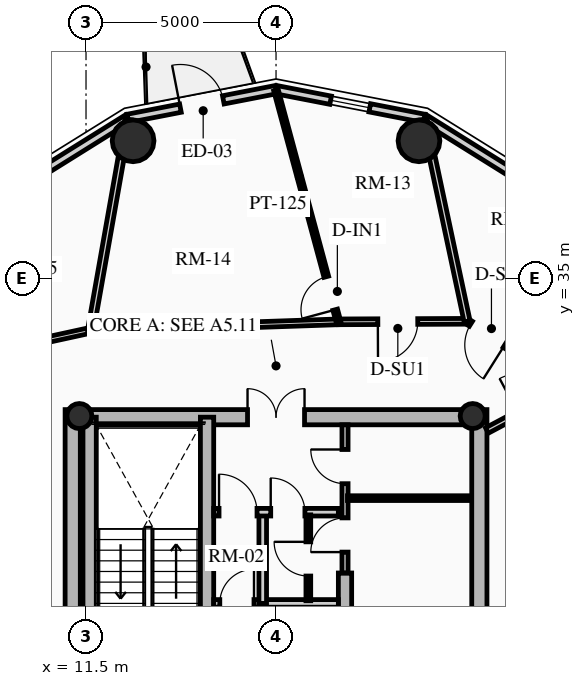
"""IFC4 building model, lengths in metres.
Left out: names, types, materials, properties, quantities, classifications, styles, units other than length and angle.
Written with IfcOpenShell. Run it as: python <this file> out.ifc"""

import sys

from ifc_helpers import new_model, si_unit, direction, frame, frame_2d, origin, origin_2d, place, context, subcontext, project, spatial, rectangle, circle, hollow_circle, extrude, source, transform, mapped, element, fill, save


model = new_model("IFC4")
c1 = context("Model", 3, precision=1e-05, world=origin(), true_north=direction((0.0, 1.0)))
c2 = subcontext(c1, "Body", "Model", "MODEL_VIEW")
j1 = project(units=[si_unit("LENGTHUNIT", "METRE"), si_unit("PLANEANGLEUNIT", "RADIAN")], contexts=[c1])
p1 = place(None, origin())
s1 = spatial("IfcSite", under=j1, at=p1, CompositionType="ELEMENT")
p2 = place(p1, origin())
s2 = spatial("IfcBuilding", under=s1, at=p2, CompositionType="ELEMENT")
p3 = place(p2, frame((0.0, 0.0, 205.39)))
s3 = spatial("IfcBuildingStorey", under=s2, at=p3, CompositionType="ELEMENT", Elevation=205.39)
for number, where, z_axis, x_axis in (
    (1, (11.15, 17.45, 0.0), (0.0, 0.0, 1.0), (0.0, 1.0, 0.0)),
    (2, (21.85, 17.45, 0.0), (0.0, 0.0, 1.0), (0.0, 1.0, 0.0)),
):
    element("IfcWall", number, at=place(p3, frame(where, z_axis=z_axis, x_axis=x_axis)), inside=s3, PredefinedType="SHEAR", context=c2, shape_type="SweptSolid", body=[
        extrude(rectangle(XDim=14.1, YDim=0.4, at=frame_2d((7.05, 0.0))), origin(), (0.0, 0.0, 1.0), 2.91),
    ])
p4 = place(p3, frame((11.15, 31.35, 0.0), z_axis=(0.0, 0.0, 1.0), x_axis=(1.0, 0.0, 0.0)))
e3 = element("IfcWall", 3, at=p4, inside=s3, PredefinedType="SHEAR", context=c2, shape_type="SweptSolid", body=[
    extrude(rectangle(XDim=10.7, YDim=0.4, at=frame_2d((5.35, 0.0))), origin(), (0.0, 0.0, 1.0), 2.91),
])
m1 = source(origin(), c2, "Body", "SweptSolid", [
    extrude(rectangle(XDim=1.5, YDim=2.02, at=frame_2d((0.75, 1.01))), frame((0.0, 0.21, 0.0), z_axis=(0.0, -1.0, 0.0), x_axis=(1.0, 0.0, 0.0)), (0.0, 0.0, 1.0), 0.42),
])
p5 = place(p4, frame((4.6, 0.0, 0.0)))
e4 = element("IfcOpeningElement", 4, at=p5, cuts=e3, PredefinedType="OPENING", context=c2, shape_type="MappedRepresentation", body=[
    mapped(m1, transform((0.0, 0.0, 0.0), x_axis=(1.0, 0.0, 0.0), y_axis=(0.0, 1.0, 0.0), z_axis=(0.0, 0.0, 1.0), scale=1.0)),
])
p6 = place(p3, frame((14.685, 17.65, 0.0), z_axis=(0.0, 0.0, 1.0), x_axis=(0.0, 1.0, 0.0)))
e5 = element("IfcWall", 5, at=p6, inside=s3, PredefinedType="SHEAR", context=c2, shape_type="SweptSolid", body=[
    extrude(rectangle(XDim=13.7, YDim=0.35, at=frame_2d((6.85, 0.0))), origin(), (0.0, 0.0, 1.0), 2.91),
])
m2 = source(origin(), c2, "Body", "SweptSolid", [
    extrude(rectangle(XDim=1.1, YDim=2.015, at=frame_2d((0.55, 1.007))), frame((0.0, 0.185, 0.0), z_axis=(0.0, -1.0, 0.0), x_axis=(1.0, 0.0, 0.0)), (0.0, 0.0, 1.0), 0.37),
])
p7 = place(p6, frame((4.85, 0.0, 0.0)))
e6 = element("IfcOpeningElement", 6, at=p7, cuts=e5, PredefinedType="OPENING", context=c2, shape_type="MappedRepresentation", body=[
    mapped(m2, transform((0.0, 0.0, 0.0), x_axis=(1.0, 0.0, 0.0), y_axis=(0.0, 1.0, 0.0), z_axis=(0.0, 0.0, 1.0), scale=1.0)),
])
p8 = place(p6, frame((0.625, 0.0, 0.0)))
e7 = element("IfcOpeningElement", 7, at=p8, cuts=e5, PredefinedType="OPENING", context=c2, shape_type="MappedRepresentation", body=[
    mapped(m2, transform((0.0, 0.0, 0.0), x_axis=(1.0, 0.0, 0.0), y_axis=(0.0, 1.0, 0.0), z_axis=(0.0, 0.0, 1.0), scale=1.0)),
])
p9 = place(p6, frame((2.625, 0.0, 0.0)))
e8 = element("IfcOpeningElement", 8, at=p9, cuts=e5, PredefinedType="OPENING", context=c2, shape_type="MappedRepresentation", body=[
    mapped(m2, transform((0.0, 0.0, 0.0), x_axis=(1.0, 0.0, 0.0), y_axis=(0.0, 1.0, 0.0), z_axis=(0.0, 0.0, 1.0), scale=1.0)),
])
m3 = source(origin(), c2, "Body", "SweptSolid", [
    extrude(rectangle(XDim=1.15, YDim=2.02, at=frame_2d((0.575, 1.01))), frame((0.0, 0.185, 0.0), z_axis=(0.0, -1.0, 0.0), x_axis=(1.0, 0.0, 0.0)), (0.0, 0.0, 1.0), 0.37),
])
p10 = place(p6, frame((7.27, 0.0, 0.0)))
e9 = element("IfcOpeningElement", 9, at=p10, cuts=e5, PredefinedType="OPENING", context=c2, shape_type="MappedRepresentation", body=[
    mapped(m3, transform((0.0, 0.0, 0.0), x_axis=(1.0, 0.0, 0.0), y_axis=(0.0, 1.0, 0.0), z_axis=(0.0, 0.0, 1.0), scale=1.0)),
])
p11 = place(p3, frame((18.315, 17.65, 0.0), z_axis=(0.0, 0.0, 1.0), x_axis=(0.0, 1.0, 0.0)))
e10 = element("IfcWall", 10, at=p11, inside=s3, PredefinedType="SHEAR", context=c2, shape_type="SweptSolid", body=[
    extrude(rectangle(XDim=9.6, YDim=0.35, at=frame_2d((4.8, 0.0))), origin(), (0.0, 0.0, 1.0), 2.91),
])
p12 = place(p11, frame((5.28, 0.0, 0.0)))
e11 = element("IfcOpeningElement", 11, at=p12, cuts=e10, PredefinedType="OPENING", context=c2, shape_type="MappedRepresentation", body=[
    mapped(m3, transform((0.0, 0.0, 0.0), x_axis=(1.0, 0.0, 0.0), y_axis=(0.0, 1.0, 0.0), z_axis=(0.0, 0.0, 1.0), scale=1.0)),
])
p13 = place(p3, frame((11.595, 24.655, 0.0), z_axis=(0.0, 0.0, 1.0), x_axis=(0.0, 1.0, 0.0)))
e12 = element("IfcWall", 12, at=p13, inside=s3, PredefinedType="SHEAR", context=c2, shape_type="SweptSolid", body=[
    extrude(rectangle(XDim=6.695, YDim=0.35, at=frame_2d((3.348, 0.0))), origin(), (0.0, 0.0, 1.0), 2.91),
])
for number, where, z_axis, x_axis in (
    (13, (11.325, 31.38, 0.0), (0.0, 0.0, 1.0), (1.0, 0.0, 0.0)),
    (14, (21.675, 31.38, 0.0), (0.0, 0.0, 1.0), (1.0, 0.0, 0.0)),
):
    element("IfcColumn", number, at=place(p3, frame(where, z_axis=z_axis, x_axis=x_axis)), inside=s3, PredefinedType="COLUMN", context=c2, shape_type="SweptSolid", body=[
        extrude(hollow_circle(Radius=0.33, WallThickness=0.025, at=origin_2d()), origin(), (0.0, 0.0, 1.0), 2.91),
    ])
for number, where, z_axis, x_axis in (
    (15, (20.261, 38.623, 0.0), (0.0, 0.0, 1.0), (1.0, 0.0, 0.0)),
    (16, (12.739, 38.623, 0.0), (0.0, 0.0, 1.0), (1.0, 0.0, 0.0)),
):
    element("IfcColumn", number, at=place(p3, frame(where, z_axis=z_axis, x_axis=x_axis)), inside=s3, PredefinedType="USERDEFINED", context=c2, shape_type="SweptSolid", body=[
        extrude(circle(Radius=0.55, at=origin_2d()), origin(), (0.0, 0.0, 1.0), 2.91),
    ])
p14 = place(p3, frame((20.403, 39.213, 0.0), z_axis=(0.0, 0.0, 1.0), x_axis=(0.848318713376, -0.529485939886, 0.0)))
e17 = element("IfcWall", 17, at=p14, inside=s3, PredefinedType="SOLIDWALL", context=c2, shape_type="SweptSolid", body=[
    extrude(rectangle(XDim=4.15, YDim=0.22, at=frame_2d((2.075, 0.0))), origin(), (0.0, 0.0, 1.0), 2.322),
])
p15 = place(p3, frame((16.5, 39.97, 0.0), z_axis=(0.0, 0.0, 1.0), x_axis=(0.981700307484, -0.190432419211, 0.0)))
e18 = element("IfcWall", 18, at=p15, inside=s3, PredefinedType="SOLIDWALL", context=c2, shape_type="SweptSolid", body=[
    extrude(rectangle(XDim=3.976, YDim=0.22, at=frame_2d((1.988, 0.0))), origin(), (0.0, 0.0, 1.0), 2.322),
])
m4 = source(origin(), c2, "Body", "SweptSolid", [
    extrude(rectangle(XDim=1.05, YDim=1.3, at=frame_2d((0.525, 0.65))), frame((0.0, 0.12, 0.0), z_axis=(0.0, -1.0, 0.0), x_axis=(1.0, 0.0, 0.0)), (0.0, 0.0, 1.0), 0.24),
])
p16 = place(p15, frame((1.463, 0.0, 0.65)))
e19 = element("IfcOpeningElement", 19, at=p16, cuts=e18, PredefinedType="OPENING", context=c2, shape_type="MappedRepresentation", body=[
    mapped(m4, transform((0.0, 0.0, 0.0), x_axis=(1.0, 0.0, 0.0), y_axis=(0.0, 1.0, 0.0), z_axis=(0.0, 0.0, 1.0), scale=1.0)),
])
p17 = place(p3, frame((12.597, 39.213, 0.0), z_axis=(0.0, 0.0, 1.0), x_axis=(0.981700307484, 0.190432419211, 0.0)))
e20 = element("IfcWall", 20, at=p17, inside=s3, PredefinedType="SOLIDWALL", context=c2, shape_type="SweptSolid", body=[
    extrude(rectangle(XDim=3.976, YDim=0.22, at=frame_2d((1.988, 0.0))), origin(), (0.0, 0.0, 1.0), 2.322),
])
m5 = source(origin(), c2, "Body", "SweptSolid", [
    extrude(rectangle(XDim=1.15, YDim=2.005, at=frame_2d((0.575, 1.002))), frame((0.0, 0.12, 0.0), z_axis=(0.0, -1.0, 0.0), x_axis=(1.0, 0.0, 0.0)), (0.0, 0.0, 1.0), 0.24),
])
p18 = place(p17, frame((1.413, 0.0, 0.0)))
e21 = element("IfcOpeningElement", 21, at=p18, cuts=e20, PredefinedType="OPENING", context=c2, shape_type="MappedRepresentation", body=[
    mapped(m5, transform((0.0, 0.0, 0.0), x_axis=(1.0, 0.0, 0.0), y_axis=(0.0, 1.0, 0.0), z_axis=(0.0, 0.0, 1.0), scale=1.0)),
])
p19 = place(p3, frame((9.076, 37.015, 0.0), z_axis=(0.0, 0.0, 1.0), x_axis=(0.848318713376, 0.529485939886, 0.0)))
e22 = element("IfcWall", 22, at=p19, inside=s3, PredefinedType="SOLIDWALL", context=c2, shape_type="SweptSolid", body=[
    extrude(rectangle(XDim=4.15, YDim=0.22, at=frame_2d((2.075, 0.0))), origin(), (0.0, 0.0, 1.0), 2.322),
])
p20 = place(p3, frame((14.86, 26.45, 0.0), z_axis=(0.0, 0.0, 1.0), x_axis=(1.0, 0.0, 0.0)))
e23 = element("IfcWall", 23, at=p20, inside=s3, PredefinedType="PARTITIONING", context=c2, shape_type="SweptSolid", body=[
    extrude(rectangle(XDim=3.28, YDim=0.2, at=frame_2d((1.64, 0.0))), origin(), (0.0, 0.0, 1.0), 2.685),
])
m6 = source(origin(), c2, "Body", "SweptSolid", [
    extrude(rectangle(XDim=0.9, YDim=2.005, at=frame_2d((0.45, 1.002))), frame((0.0, 0.11, 0.0), z_axis=(0.0, -1.0, 0.0), x_axis=(1.0, 0.0, 0.0)), (0.0, 0.0, 1.0), 0.22),
])
p21 = place(p20, frame((0.16, 0.0, 0.0)))
e24 = element("IfcOpeningElement", 24, at=p21, cuts=e23, PredefinedType="OPENING", context=c2, shape_type="MappedRepresentation", body=[
    mapped(m6, transform((0.0, 0.0, 0.0), x_axis=(1.0, 0.0, 0.0), y_axis=(0.0, 1.0, 0.0), z_axis=(0.0, 0.0, 1.0), scale=1.0)),
])
p22 = place(p3, frame((16.15, 26.45, 0.0), z_axis=(0.0, 0.0, 1.0), x_axis=(0.0, 1.0, 0.0)))
e25 = element("IfcWall", 25, at=p22, inside=s3, PredefinedType="PARTITIONING", context=c2, shape_type="SweptSolid", body=[
    extrude(rectangle(XDim=2.4, YDim=0.2, at=frame_2d((1.2, 0.0))), origin(), (0.0, 0.0, 1.0), 2.685),
])
p23 = place(p3, frame((14.86, 28.85, 0.0), z_axis=(0.0, 0.0, 1.0), x_axis=(1.0, 0.0, 0.0)))
e26 = element("IfcWall", 26, at=p23, inside=s3, PredefinedType="PARTITIONING", context=c2, shape_type="SweptSolid", body=[
    extrude(rectangle(XDim=3.28, YDim=0.2, at=frame_2d((1.64, 0.0))), origin(), (0.0, 0.0, 1.0), 2.685),
])
m7 = source(origin(), c2, "Body", "SweptSolid", [
    extrude(rectangle(XDim=1.0, YDim=2.015, at=frame_2d((0.5, 1.007))), frame((0.0, 0.11, 0.0), z_axis=(0.0, -1.0, 0.0), x_axis=(1.0, 0.0, 0.0)), (0.0, 0.0, 1.0), 0.22),
])
p24 = place(p23, frame((0.14, 0.0, 0.0)))
e27 = element("IfcOpeningElement", 27, at=p24, cuts=e26, PredefinedType="OPENING", context=c2, shape_type="MappedRepresentation", body=[
    mapped(m7, transform((0.0, 0.0, 0.0), x_axis=(1.0, 0.0, 0.0), y_axis=(0.0, 1.0, 0.0), z_axis=(0.0, 0.0, 1.0), scale=1.0)),
])
p25 = place(p23, frame((1.5, 0.0, 0.0)))
e28 = element("IfcOpeningElement", 28, at=p25, cuts=e26, PredefinedType="OPENING", context=c2, shape_type="MappedRepresentation", body=[
    mapped(m6, transform((0.0, 0.0, 0.0), x_axis=(1.0, 0.0, 0.0), y_axis=(0.0, 1.0, 0.0), z_axis=(0.0, 0.0, 1.0), scale=1.0)),
])
p26 = place(p3, frame((17.35, 26.52, 0.0), z_axis=(0.0, 0.0, 1.0), x_axis=(0.0, 1.0, 0.0)))
e29 = element("IfcWall", 29, at=p26, inside=s3, PredefinedType="PARTITIONING", context=c2, shape_type="SweptSolid", body=[
    extrude(rectangle(XDim=2.26, YDim=0.125, at=frame_2d((1.13, 0.0))), origin(), (0.0, 0.0, 1.0), 2.685),
])
m8 = source(origin(), c2, "Body", "SweptSolid", [
    extrude(rectangle(XDim=0.9, YDim=2.005, at=frame_2d((0.45, 1.002))), frame((0.0, 0.073, 0.0), z_axis=(0.0, -1.0, 0.0), x_axis=(1.0, 0.0, 0.0)), (0.0, 0.0, 1.0), 0.145),
])
p27 = place(p26, frame((0.65, 0.0, 0.0)))
e30 = element("IfcOpeningElement", 30, at=p27, cuts=e29, PredefinedType="OPENING", context=c2, shape_type="MappedRepresentation", body=[
    mapped(m8, transform((0.0, 0.0, 0.0), x_axis=(1.0, 0.0, 0.0), y_axis=(0.0, 1.0, 0.0), z_axis=(0.0, 0.0, 1.0), scale=1.0)),
])
p28 = place(p3, frame((18.315, 27.25, 0.0), z_axis=(0.0, 0.0, 1.0), x_axis=(0.0, 1.0, 0.0)))
e31 = element("IfcWall", 31, at=p28, inside=s3, PredefinedType="PARTITIONING", context=c2, shape_type="SweptSolid", body=[
    extrude(rectangle(XDim=3.9, YDim=0.16, at=frame_2d((1.95, 0.0))), origin(), (0.0, 0.0, 1.0), 2.685),
])
m9 = source(origin(), c2, "Body", "SweptSolid", [
    extrude(rectangle(XDim=0.9, YDim=2.005, at=frame_2d((0.45, 1.002))), frame((0.0, 0.09, 0.0), z_axis=(0.0, -1.0, 0.0), x_axis=(1.0, 0.0, 0.0)), (0.0, 0.0, 1.0), 0.18),
])
p29 = place(p28, frame((0.55, 0.0, 0.0)))
e32 = element("IfcOpeningElement", 32, at=p29, cuts=e31, PredefinedType="OPENING", context=c2, shape_type="MappedRepresentation", body=[
    mapped(m9, transform((0.0, 0.0, 0.0), x_axis=(1.0, 0.0, 0.0), y_axis=(0.0, 1.0, 0.0), z_axis=(0.0, 0.0, 1.0), scale=1.0)),
])
p30 = place(p28, frame((2.35, 0.0, 0.0)))
e33 = element("IfcOpeningElement", 33, at=p30, cuts=e31, PredefinedType="OPENING", context=c2, shape_type="MappedRepresentation", body=[
    mapped(m9, transform((0.0, 0.0, 0.0), x_axis=(1.0, 0.0, 0.0), y_axis=(0.0, 1.0, 0.0), z_axis=(0.0, 0.0, 1.0), scale=1.0)),
])
p31 = place(p3, frame((18.38, 29.22, 0.0), z_axis=(0.0, 0.0, 1.0), x_axis=(1.0, 0.0, 0.0)))
e34 = element("IfcWall", 34, at=p31, inside=s3, PredefinedType="PARTITIONING", context=c2, shape_type="SweptSolid", body=[
    extrude(rectangle(XDim=3.22, YDim=0.125, at=frame_2d((1.61, 0.0))), origin(), (0.0, 0.0, 1.0), 2.222),
])
p32 = place(p3, frame((22.877, 33.022, 0.0), z_axis=(0.0, 0.0, 1.0), x_axis=(-0.845895608855, 0.533348496689, 0.0)))
e35 = element("IfcWall", 35, at=p32, inside=s3, PredefinedType="PARTITIONING", context=c2, shape_type="SweptSolid", body=[
    extrude(rectangle(XDim=1.597, YDim=0.15, at=frame_2d((0.798, 0.0))), origin(), (0.0, 0.0, 1.0), 2.255),
])
m10 = source(origin(), c2, "Body", "SweptSolid", [
    extrude(rectangle(XDim=1.05, YDim=2.015, at=frame_2d((0.525, 1.007))), frame((0.0, 0.085, 0.0), z_axis=(0.0, -1.0, 0.0), x_axis=(1.0, 0.0, 0.0)), (0.0, 0.0, 1.0), 0.17),
])
p33 = place(p32, frame((0.427, 0.0, 0.0)))
e36 = element("IfcOpeningElement", 36, at=p33, cuts=e35, PredefinedType="OPENING", context=c2, shape_type="MappedRepresentation", body=[
    mapped(m10, transform((0.0, 0.0, 0.0), x_axis=(1.0, 0.0, 0.0), y_axis=(0.0, 1.0, 0.0), z_axis=(0.0, 0.0, 1.0), scale=1.0)),
])
p34 = place(p3, frame((21.527, 33.873, 0.0), z_axis=(0.0, 0.0, 1.0), x_axis=(-0.999991838845, -0.004040079574, 0.0)))
e37 = element("IfcWall", 37, at=p34, inside=s3, PredefinedType="PARTITIONING", context=c2, shape_type="SweptSolid", body=[
    extrude(rectangle(XDim=3.384, YDim=0.15, at=frame_2d((1.692, 0.0))), origin(), (0.0, 0.0, 1.0), 2.322),
])
p35 = place(p34, frame((1.298, 0.0, 0.0)))
e38 = element("IfcOpeningElement", 38, at=p35, cuts=e37, PredefinedType="OPENING", context=c2, shape_type="MappedRepresentation", body=[
    mapped(m10, transform((0.0, 0.0, 0.0), x_axis=(1.0, 0.0, 0.0), y_axis=(0.0, 1.0, 0.0), z_axis=(0.0, 0.0, 1.0), scale=1.0)),
])
p36 = place(p3, frame((18.143, 33.86, 0.0), z_axis=(0.0, 0.0, 1.0), x_axis=(-0.999419208319, -0.034077060363, 0.0)))
e39 = element("IfcWall", 39, at=p36, inside=s3, PredefinedType="PARTITIONING", context=c2, shape_type="SweptSolid", body=[
    extrude(rectangle(XDim=6.527, YDim=0.15, at=frame_2d((3.263, 0.0))), origin(), (0.0, 0.0, 1.0), 2.255),
])
p37 = place(p3, frame((11.62, 33.637, 0.0), z_axis=(0.0, 0.0, 1.0), x_axis=(-0.97702579435, -0.213121085711, 0.0)))
e40 = element("IfcWall", 40, at=p37, inside=s3, PredefinedType="PARTITIONING", context=c2, shape_type="SweptSolid", body=[
    extrude(rectangle(XDim=1.935, YDim=0.15, at=frame_2d((0.967, 0.0))), origin(), (0.0, 0.0, 1.0), 2.255),
])
p38 = place(p3, frame((21.527, 33.873, 0.0), z_axis=(0.0, 0.0, 1.0), x_axis=(-0.207772326864, 0.97817721308, 0.0)))
e41 = element("IfcWall", 41, at=p38, inside=s3, PredefinedType="PARTITIONING", context=c2, shape_type="SweptSolid", body=[
    extrude(rectangle(XDim=5.439, YDim=0.16, at=frame_2d((2.72, 0.0))), origin(), (0.0, 0.0, 1.0), 2.322),
])
p39 = place(p3, frame((11.62, 33.637, 0.0), z_axis=(0.0, 0.0, 1.0), x_axis=(0.174269061361, 0.984698072636, 0.0)))
e42 = element("IfcWall", 42, at=p39, inside=s3, PredefinedType="PARTITIONING", context=c2, shape_type="SweptSolid", body=[
    extrude(rectangle(XDim=5.643, YDim=0.16, at=frame_2d((2.822, 0.0))), origin(), (0.0, 0.0, 1.0), 2.322),
])
p40 = place(p3, frame((22.05, 31.0, 0.0), z_axis=(0.0, 0.0, 1.0), x_axis=(0.882791584709, 0.469764853908, 0.0)))
e43 = element("IfcWall", 43, at=p40, inside=s3, PredefinedType="PARTITIONING", context=c2, shape_type="SweptSolid", body=[
    extrude(rectangle(XDim=2.186, YDim=0.16, at=frame_2d((1.093, 0.0))), origin(), (0.0, 0.0, 1.0), 2.255),
])
m11 = source(origin(), c2, "Body", "SweptSolid", [
    extrude(rectangle(XDim=1.05, YDim=2.015, at=frame_2d((0.525, 1.007))), frame((0.0, 0.09, 0.0), z_axis=(0.0, -1.0, 0.0), x_axis=(1.0, 0.0, 0.0)), (0.0, 0.0, 1.0), 0.18),
])
p41 = place(p40, frame((0.936, 0.0, 0.0)))
e44 = element("IfcOpeningElement", 44, at=p41, cuts=e43, PredefinedType="OPENING", context=c2, shape_type="MappedRepresentation", body=[
    mapped(m11, transform((0.0, 0.0, 0.0), x_axis=(1.0, 0.0, 0.0), y_axis=(0.0, 1.0, 0.0), z_axis=(0.0, 0.0, 1.0), scale=1.0)),
])
p42 = place(p3, frame((18.143, 33.86, 0.0), z_axis=(0.0, 0.0, 1.0), x_axis=(-0.260434252895, 0.965491584592, 0.0)))
e45 = element("IfcWall", 45, at=p42, inside=s3, PredefinedType="PARTITIONING", context=c2, shape_type="SweptSolid", body=[
    extrude(rectangle(XDim=6.308, YDim=0.125, at=frame_2d((3.154, 0.0))), origin(), (0.0, 0.0, 1.0), 2.322),
])
p43 = place(p42, frame((0.33, 0.0, 0.0)))
e46 = element("IfcOpeningElement", 46, at=p43, cuts=e45, PredefinedType="OPENING", context=c2, shape_type="MappedRepresentation", body=[
    mapped(m8, transform((0.0, 0.0, 0.0), x_axis=(1.0, 0.0, 0.0), y_axis=(0.0, 1.0, 0.0), z_axis=(0.0, 0.0, 1.0), scale=1.0)),
])
m12 = source(origin(), c2, "Body", "SweptSolid", [
    extrude(rectangle(XDim=1.05, YDim=1.3, at=frame_2d((0.525, 0.65))), frame((0.0, 0.03, 0.0), z_axis=(0.0, -1.0, 0.0), x_axis=(1.0, 0.0, 0.0)), (0.0, 0.0, 1.0), 0.06),
])
p44 = place(p16, origin())
e47 = element("IfcWindow", 47, at=p44, inside=s3, PartitioningType="SINGLE_PANEL", PredefinedType="WINDOW", context=c2, shape_type="MappedRepresentation", body=[
    mapped(m12, transform((0.0, 0.0, 0.0), x_axis=(1.0, 0.0, 0.0), y_axis=(0.0, 1.0, 0.0), z_axis=(0.0, 0.0, 1.0), scale=1.0)),
])
fill(e19, e47)
m13 = source(origin(), c2, "Body", "SweptSolid", [
    extrude(rectangle(XDim=1.15, YDim=2.005, at=frame_2d((0.575, 1.002))), frame((0.0, 0.025, 0.0), z_axis=(0.0, -1.0, 0.0), x_axis=(1.0, 0.0, 0.0)), (0.0, 0.0, 1.0), 0.05),
])
p45 = place(p18, origin())
e48 = element("IfcDoor", 48, at=p45, inside=s3, OperationType="SINGLE_SWING_LEFT", PredefinedType="DOOR", context=c2, shape_type="MappedRepresentation", body=[
    mapped(m13, transform((0.0, 0.0, 0.0), x_axis=(1.0, 0.0, 0.0), y_axis=(0.0, 1.0, 0.0), z_axis=(0.0, 0.0, 1.0), scale=1.0)),
])
fill(e21, e48)
m14 = source(origin(), c2, "Body", "SweptSolid", [
    extrude(rectangle(XDim=1.5, YDim=2.02, at=frame_2d((0.75, 1.01))), frame((0.0, 0.025, 0.0), z_axis=(0.0, -1.0, 0.0), x_axis=(1.0, 0.0, 0.0)), (0.0, 0.0, 1.0), 0.05),
])
p46 = place(p5, origin())
e49 = element("IfcDoor", 49, at=p46, inside=s3, OperationType="DOUBLE_DOOR_SINGLE_SWING", PredefinedType="DOOR", context=c2, shape_type="MappedRepresentation", body=[
    mapped(m14, transform((0.0, 0.0, 0.0), x_axis=(1.0, 0.0, 0.0), y_axis=(0.0, 1.0, 0.0), z_axis=(0.0, 0.0, 1.0), scale=1.0)),
])
fill(e4, e49)
m15 = source(origin(), c2, "Body", "SweptSolid", [
    extrude(rectangle(XDim=0.9, YDim=2.005, at=frame_2d((0.45, 1.002))), frame((0.0, 0.025, 0.0), z_axis=(0.0, -1.0, 0.0), x_axis=(1.0, 0.0, 0.0)), (0.0, 0.0, 1.0), 0.05),
])
p47 = place(p21, origin())
e50 = element("IfcDoor", 50, at=p47, inside=s3, OperationType="SINGLE_SWING_RIGHT", PredefinedType="DOOR", context=c2, shape_type="MappedRepresentation", body=[
    mapped(m15, transform((0.0, 0.0, 0.0), x_axis=(1.0, 0.0, 0.0), y_axis=(0.0, 1.0, 0.0), z_axis=(0.0, 0.0, 1.0), scale=1.0)),
])
fill(e24, e50)
m16 = source(origin(), c2, "Body", "SweptSolid", [
    extrude(rectangle(XDim=1.0, YDim=2.015, at=frame_2d((0.5, 1.007))), frame((0.0, 0.025, 0.0), z_axis=(0.0, -1.0, 0.0), x_axis=(1.0, 0.0, 0.0)), (0.0, 0.0, 1.0), 0.05),
])
p48 = place(p24, origin())
e51 = element("IfcDoor", 51, at=p48, inside=s3, OperationType="SINGLE_SWING_LEFT", PredefinedType="DOOR", context=c2, shape_type="MappedRepresentation", body=[
    mapped(m16, transform((0.0, 0.0, 0.0), x_axis=(1.0, 0.0, 0.0), y_axis=(0.0, 1.0, 0.0), z_axis=(0.0, 0.0, 1.0), scale=1.0)),
])
fill(e27, e51)
p49 = place(p25, origin())
e52 = element("IfcDoor", 52, at=p49, inside=s3, OperationType="SINGLE_SWING_LEFT", PredefinedType="DOOR", context=c2, shape_type="MappedRepresentation", body=[
    mapped(m15, transform((0.0, 0.0, 0.0), x_axis=(1.0, 0.0, 0.0), y_axis=(0.0, 1.0, 0.0), z_axis=(0.0, 0.0, 1.0), scale=1.0)),
])
fill(e28, e52)
p50 = place(p27, origin())
e53 = element("IfcDoor", 53, at=p50, inside=s3, OperationType="SINGLE_SWING_RIGHT", PredefinedType="DOOR", context=c2, shape_type="MappedRepresentation", body=[
    mapped(m15, transform((0.0, 0.0, 0.0), x_axis=(1.0, 0.0, 0.0), y_axis=(0.0, 1.0, 0.0), z_axis=(0.0, 0.0, 1.0), scale=1.0)),
])
fill(e30, e53)
p51 = place(p29, origin())
e54 = element("IfcDoor", 54, at=p51, inside=s3, OperationType="SINGLE_SWING_LEFT", PredefinedType="DOOR", context=c2, shape_type="MappedRepresentation", body=[
    mapped(m15, transform((0.0, 0.0, 0.0), x_axis=(1.0, 0.0, 0.0), y_axis=(0.0, 1.0, 0.0), z_axis=(0.0, 0.0, 1.0), scale=1.0)),
])
fill(e32, e54)
p52 = place(p30, origin())
e55 = element("IfcDoor", 55, at=p52, inside=s3, OperationType="SINGLE_SWING_RIGHT", PredefinedType="DOOR", context=c2, shape_type="MappedRepresentation", body=[
    mapped(m15, transform((0.0, 0.0, 0.0), x_axis=(1.0, 0.0, 0.0), y_axis=(0.0, 1.0, 0.0), z_axis=(0.0, 0.0, 1.0), scale=1.0)),
])
fill(e33, e55)
m17 = source(origin(), c2, "Body", "SweptSolid", [
    extrude(rectangle(XDim=1.05, YDim=2.015, at=frame_2d((0.525, 1.007))), frame((0.0, 0.025, 0.0), z_axis=(0.0, -1.0, 0.0), x_axis=(1.0, 0.0, 0.0)), (0.0, 0.0, 1.0), 0.05),
])
p53 = place(p33, origin())
e56 = element("IfcDoor", 56, at=p53, inside=s3, OperationType="SINGLE_SWING_LEFT", PredefinedType="DOOR", context=c2, shape_type="MappedRepresentation", body=[
    mapped(m17, transform((0.0, 0.0, 0.0), x_axis=(1.0, 0.0, 0.0), y_axis=(0.0, 1.0, 0.0), z_axis=(0.0, 0.0, 1.0), scale=1.0)),
])
fill(e36, e56)
p54 = place(p35, origin())
e57 = element("IfcDoor", 57, at=p54, inside=s3, OperationType="SINGLE_SWING_RIGHT", PredefinedType="DOOR", context=c2, shape_type="MappedRepresentation", body=[
    mapped(m17, transform((0.0, 0.0, 0.0), x_axis=(1.0, 0.0, 0.0), y_axis=(0.0, 1.0, 0.0), z_axis=(0.0, 0.0, 1.0), scale=1.0)),
])
fill(e38, e57)
p55 = place(p43, origin())
e58 = element("IfcDoor", 58, at=p55, inside=s3, OperationType="SINGLE_SWING_LEFT", PredefinedType="DOOR", context=c2, shape_type="MappedRepresentation", body=[
    mapped(m15, transform((0.0, 0.0, 0.0), x_axis=(1.0, 0.0, 0.0), y_axis=(0.0, 1.0, 0.0), z_axis=(0.0, 0.0, 1.0), scale=1.0)),
])
fill(e46, e58)
save(model, sys.argv[1])
